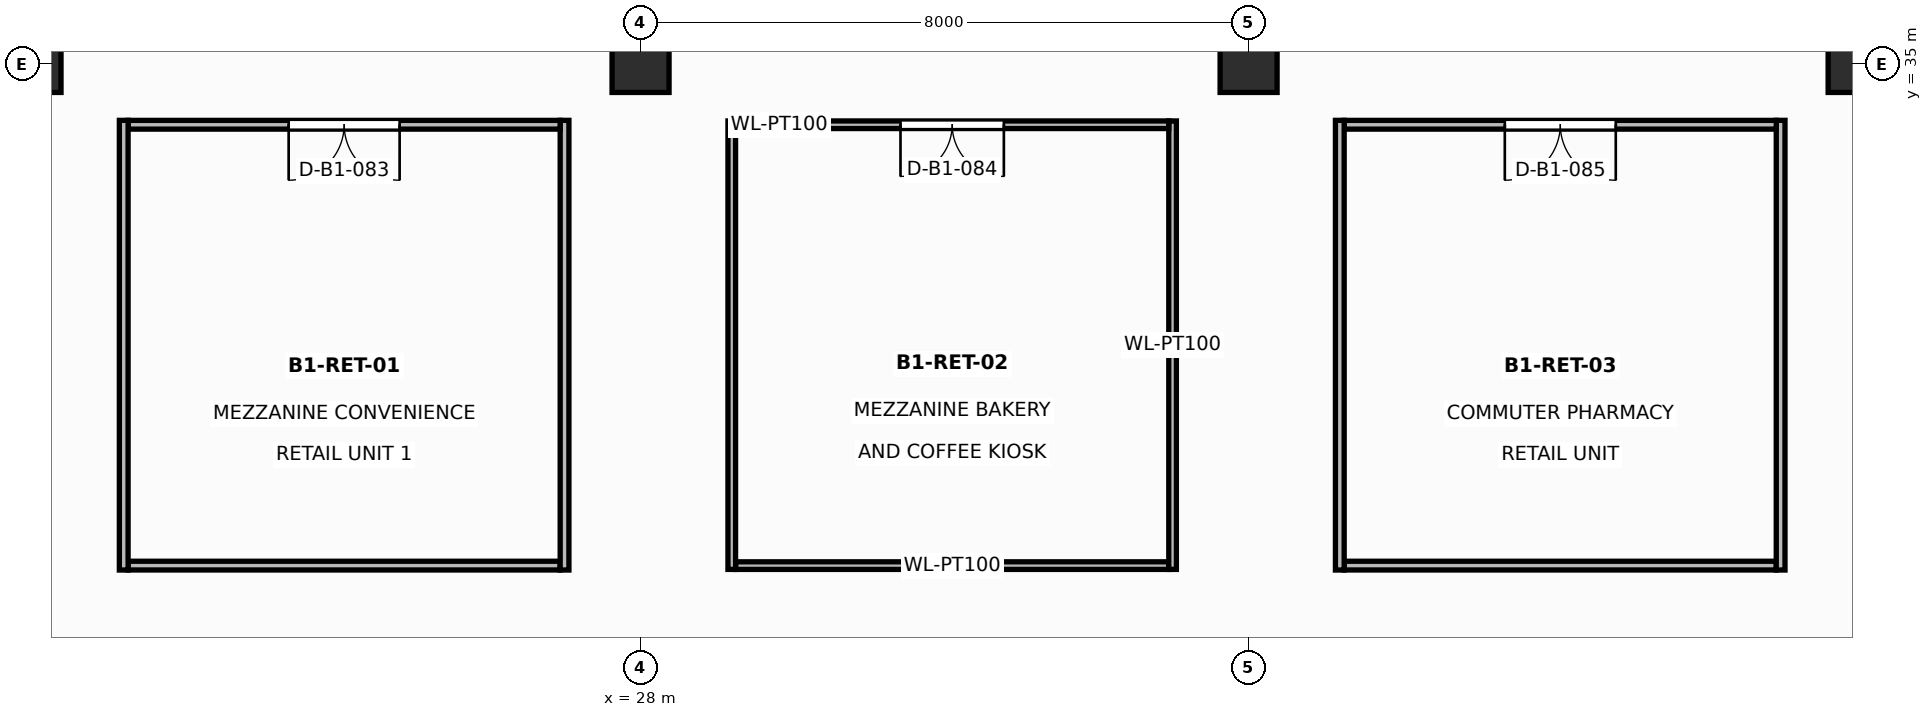
"""IFC4 building model, lengths in metres.
Left out: names, types, materials, properties, quantities, classifications, styles, units other than length and angle.
Written with IfcOpenShell. Run it as: python <this file> out.ifc"""

import sys

from ifc_helpers import new_model, si_unit, direction, frame, frame_2d, origin, origin_2d, place, context, subcontext, project, spatial, rectangle, extrude, element, fill, save


model = new_model("IFC4")
c1 = context("Model", 3, precision=1e-05, world=origin(), true_north=direction((0.0, 1.0)))
c2 = subcontext(c1, "Body", "Model", "MODEL_VIEW")
j1 = project(units=[si_unit("LENGTHUNIT", "METRE"), si_unit("PLANEANGLEUNIT", "RADIAN")], contexts=[c1])
p1 = place(None, origin())
s1 = spatial("IfcSite", under=j1, at=p1, CompositionType="ELEMENT")
p2 = place(p1, origin())
s2 = spatial("IfcBuilding", under=s1, at=p2, CompositionType="ELEMENT")
p3 = place(p2, frame((0.0, 0.0, -5.6)))
s3 = spatial("IfcBuildingStorey", under=s2, at=p3, CompositionType="ELEMENT", Elevation=-5.6)
for number, where, z_axis, x_axis in (
    (1, (20.0, 35.0, 0.0), (0.0, 0.0, 1.0), (1.0, 0.0, 0.0)),
    (2, (28.0, 35.0, 0.0), (0.0, 0.0, 1.0), (1.0, 0.0, 0.0)),
    (3, (36.0, 35.0, 0.0), (0.0, 0.0, 1.0), (1.0, 0.0, 0.0)),
    (4, (44.0, 35.0, 0.0), (0.0, 0.0, 1.0), (1.0, 0.0, 0.0)),
):
    element("IfcColumn", number, at=place(p3, frame(where, z_axis=z_axis, x_axis=x_axis)), inside=s3, PredefinedType="COLUMN", context=c2, shape_type="SweptSolid", body=[
        extrude(rectangle(XDim=0.75, YDim=0.75, at=origin_2d()), origin(), (0.0, 0.0, 1.0), 5.6),
    ])
p4 = place(p3, frame((21.258, 28.4, 0.0), z_axis=(0.0, 0.0, 1.0), x_axis=(1.0, 0.0, 0.0)))
e5 = element("IfcWall", 5, at=p4, inside=s3, PredefinedType="PARTITIONING", context=c2, shape_type="SweptSolid", body=[
    extrude(rectangle(XDim=5.684, YDim=0.115, at=frame_2d((2.842, 0.0))), origin(), (0.0, 0.0, 1.0), 5.18),
])
p5 = place(p3, frame((27.0, 28.342, 0.0), z_axis=(0.0, 0.0, 1.0), x_axis=(0.0, 1.0, 0.0)))
e6 = element("IfcWall", 6, at=p5, inside=s3, PredefinedType="PARTITIONING", context=c2, shape_type="SweptSolid", body=[
    extrude(rectangle(XDim=5.916, YDim=0.115, at=frame_2d((2.958, 0.0))), origin(), (0.0, 0.0, 1.0), 4.625),
])
p6 = place(p3, frame((26.942, 34.2, 0.0), z_axis=(0.0, 0.0, 1.0), x_axis=(-1.0, 0.0, 0.0)))
e7 = element("IfcWall", 7, at=p6, inside=s3, PredefinedType="PARTITIONING", context=c2, shape_type="SweptSolid", body=[
    extrude(rectangle(XDim=5.684, YDim=0.115, at=frame_2d((2.842, 0.0))), origin(), (0.0, 0.0, 1.0), 5.18),
])
p7 = place(p6, frame((2.112, 0.0, 0.0)))
e8 = element("IfcOpeningElement", 8, at=p7, cuts=e7, PredefinedType="OPENING", context=c2, shape_type="SweptSolid", body=[
    extrude(rectangle(XDim=1.46, YDim=2.2, at=frame_2d((0.73, 1.1))), frame((0.0, 0.067, 0.0), z_axis=(0.0, -1.0, 0.0), x_axis=(1.0, 0.0, 0.0)), (0.0, 0.0, 1.0), 0.135),
])
p8 = place(p3, frame((21.2, 34.258, 0.0), z_axis=(0.0, 0.0, 1.0), x_axis=(0.0, -1.0, 0.0)))
e9 = element("IfcWall", 9, at=p8, inside=s3, PredefinedType="PARTITIONING", context=c2, shape_type="SweptSolid", body=[
    extrude(rectangle(XDim=5.916, YDim=0.115, at=frame_2d((2.958, 0.0))), origin(), (0.0, 0.0, 1.0), 4.625),
])
p9 = place(p3, frame((29.25, 28.4, 0.0), z_axis=(0.0, 0.0, 1.0), x_axis=(1.0, 0.0, 0.0)))
e10 = element("IfcWall", 10, at=p9, inside=s3, PredefinedType="PARTITIONING", context=c2, shape_type="SweptSolid", body=[
    extrude(rectangle(XDim=5.7, YDim=0.1, at=frame_2d((2.85, 0.0))), origin(), (0.0, 0.0, 1.0), 5.18),
])
p10 = place(p3, frame((35.0, 28.35, 0.0), z_axis=(0.0, 0.0, 1.0), x_axis=(0.0, 1.0, 0.0)))
e11 = element("IfcWall", 11, at=p10, inside=s3, PredefinedType="PARTITIONING", context=c2, shape_type="SweptSolid", body=[
    extrude(rectangle(XDim=5.9, YDim=0.1, at=frame_2d((2.95, 0.0))), origin(), (0.0, 0.0, 1.0), 4.625),
])
p11 = place(p3, frame((34.95, 34.2, 0.0), z_axis=(0.0, 0.0, 1.0), x_axis=(-1.0, 0.0, 0.0)))
e12 = element("IfcWall", 12, at=p11, inside=s3, PredefinedType="PARTITIONING", context=c2, shape_type="SweptSolid", body=[
    extrude(rectangle(XDim=5.7, YDim=0.1, at=frame_2d((2.85, 0.0))), origin(), (0.0, 0.0, 1.0), 5.18),
])
p12 = place(p11, frame((2.17, 0.0, 0.0)))
e13 = element("IfcOpeningElement", 13, at=p12, cuts=e12, PredefinedType="OPENING", context=c2, shape_type="SweptSolid", body=[
    extrude(rectangle(XDim=1.36, YDim=2.18, at=frame_2d((0.68, 1.09))), frame((0.0, 0.06, 0.0), z_axis=(0.0, -1.0, 0.0), x_axis=(1.0, 0.0, 0.0)), (0.0, 0.0, 1.0), 0.12),
])
p13 = place(p3, frame((29.2, 34.25, 0.0), z_axis=(0.0, 0.0, 1.0), x_axis=(0.0, -1.0, 0.0)))
e14 = element("IfcWall", 14, at=p13, inside=s3, PredefinedType="PARTITIONING", context=c2, shape_type="SweptSolid", body=[
    extrude(rectangle(XDim=5.9, YDim=0.1, at=frame_2d((2.95, 0.0))), origin(), (0.0, 0.0, 1.0), 4.625),
])
p14 = place(p3, frame((37.258, 28.4, 0.0), z_axis=(0.0, 0.0, 1.0), x_axis=(1.0, 0.0, 0.0)))
e15 = element("IfcWall", 15, at=p14, inside=s3, PredefinedType="PARTITIONING", context=c2, shape_type="SweptSolid", body=[
    extrude(rectangle(XDim=5.685, YDim=0.115, at=frame_2d((2.843, 0.0))), origin(), (0.0, 0.0, 1.0), 5.18),
])
p15 = place(p3, frame((43.0, 28.342, 0.0), z_axis=(0.0, 0.0, 1.0), x_axis=(0.0, 1.0, 0.0)))
e16 = element("IfcWall", 16, at=p15, inside=s3, PredefinedType="PARTITIONING", context=c2, shape_type="SweptSolid", body=[
    extrude(rectangle(XDim=5.916, YDim=0.115, at=frame_2d((2.958, 0.0))), origin(), (0.0, 0.0, 1.0), 4.625),
])
p16 = place(p3, frame((42.943, 34.2, 0.0), z_axis=(0.0, 0.0, 1.0), x_axis=(-1.0, 0.0, 0.0)))
e17 = element("IfcWall", 17, at=p16, inside=s3, PredefinedType="PARTITIONING", context=c2, shape_type="SweptSolid", body=[
    extrude(rectangle(XDim=5.685, YDim=0.115, at=frame_2d((2.843, 0.0))), origin(), (0.0, 0.0, 1.0), 5.18),
])
p17 = place(p16, frame((2.112, 0.0, 0.0)))
e18 = element("IfcOpeningElement", 18, at=p17, cuts=e17, PredefinedType="OPENING", context=c2, shape_type="SweptSolid", body=[
    extrude(rectangle(XDim=1.46, YDim=2.2, at=frame_2d((0.73, 1.1))), frame((0.0, 0.067, 0.0), z_axis=(0.0, -1.0, 0.0), x_axis=(1.0, 0.0, 0.0)), (0.0, 0.0, 1.0), 0.135),
])
p18 = place(p3, frame((37.2, 34.258, 0.0), z_axis=(0.0, 0.0, 1.0), x_axis=(0.0, -1.0, 0.0)))
e19 = element("IfcWall", 19, at=p18, inside=s3, PredefinedType="PARTITIONING", context=c2, shape_type="SweptSolid", body=[
    extrude(rectangle(XDim=5.916, YDim=0.115, at=frame_2d((2.958, 0.0))), origin(), (0.0, 0.0, 1.0), 4.625),
])
p19 = place(p7, origin())
e20 = element("IfcDoor", 20, at=p19, inside=s3, OperationType="DOUBLE_DOOR_SINGLE_SWING", PredefinedType="DOOR", context=c2, shape_type="SweptSolid", body=[
    extrude(rectangle(XDim=1.46, YDim=2.2, at=frame_2d((0.73, 1.1))), frame((0.0, 0.025, 0.0), z_axis=(0.0, -1.0, 0.0), x_axis=(1.0, 0.0, 0.0)), (0.0, 0.0, 1.0), 0.05),
])
fill(e8, e20)
p20 = place(p12, origin())
e21 = element("IfcDoor", 21, at=p20, inside=s3, OperationType="DOUBLE_DOOR_SINGLE_SWING", PredefinedType="DOOR", context=c2, shape_type="SweptSolid", body=[
    extrude(rectangle(XDim=1.36, YDim=2.18, at=frame_2d((0.68, 1.09))), frame((0.0, 0.025, 0.0), z_axis=(0.0, -1.0, 0.0), x_axis=(1.0, 0.0, 0.0)), (0.0, 0.0, 1.0), 0.05),
])
fill(e13, e21)
p21 = place(p17, origin())
e22 = element("IfcDoor", 22, at=p21, inside=s3, OperationType="DOUBLE_DOOR_SINGLE_SWING", PredefinedType="DOOR", context=c2, shape_type="SweptSolid", body=[
    extrude(rectangle(XDim=1.46, YDim=2.2, at=frame_2d((0.73, 1.1))), frame((0.0, 0.025, 0.0), z_axis=(0.0, -1.0, 0.0), x_axis=(1.0, 0.0, 0.0)), (0.0, 0.0, 1.0), 0.05),
])
fill(e18, e22)
save(model, sys.argv[1])
